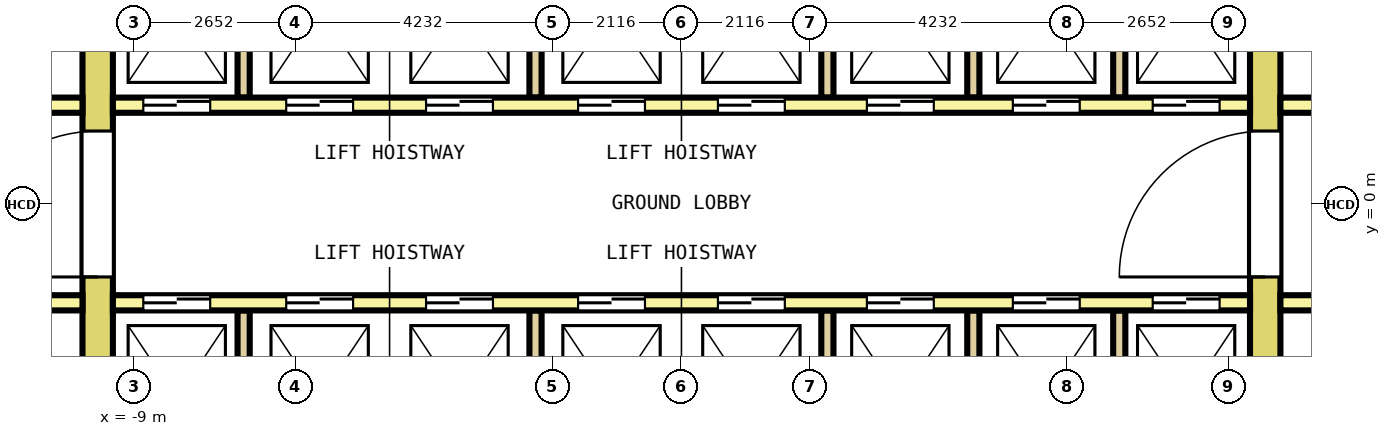
"""IFC4 building model, lengths in metres.
Left out: names, types, materials, properties, quantities, classifications, styles, units other than length and angle.
Written with IfcOpenShell. Run it as: python <this file> out.ifc"""

import sys

from ifc_helpers import new_model, si_unit, direction, frame, frame_2d, origin, place, context, subcontext, project, spatial, rectangle, extrude, element, fill, save


model = new_model("IFC4")
c1 = context("Model", 3, precision=1e-05, world=origin(), true_north=direction((0.0, 1.0)))
c2 = subcontext(c1, "Body", "Model", "MODEL_VIEW")
j1 = project(units=[si_unit("LENGTHUNIT", "METRE"), si_unit("PLANEANGLEUNIT", "RADIAN")], contexts=[c1])
p1 = place(None, origin())
s1 = spatial("IfcSite", under=j1, at=p1, CompositionType="ELEMENT")
p2 = place(p1, origin())
s2 = spatial("IfcBuilding", under=s1, at=p2, CompositionType="ELEMENT")
p3 = place(p2, origin())
s3 = spatial("IfcBuildingStorey", under=s2, at=p3, CompositionType="ELEMENT", Elevation=0.0)
p4 = place(p3, frame((-9.6, -7.7, 0.0), z_axis=(0.0, 0.0, 1.0), x_axis=(0.0, 1.0, 0.0)))
e1 = element("IfcWall", 1, at=p4, inside=s3, PredefinedType="SHEAR", context=c2, shape_type="SweptSolid", body=[
    extrude(rectangle(XDim=15.4, YDim=0.5, at=frame_2d((7.7, 0.0))), origin(), (0.0, 0.0, 1.0), 5.3),
])
p5 = place(p4, frame((6.5, 0.0, 0.0)))
e2 = element("IfcOpeningElement", 2, at=p5, cuts=e1, PredefinedType="OPENING", context=c2, shape_type="SweptSolid", body=[
    extrude(rectangle(XDim=2.4, YDim=2.1, at=frame_2d((1.2, 1.05))), frame((0.0, 0.26, 0.0), z_axis=(0.0, -1.0, 0.0), x_axis=(1.0, 0.0, 0.0)), (0.0, 0.0, 1.0), 0.52),
])
p6 = place(p4, frame((13.4, 0.0, 0.0)))
e3 = element("IfcOpeningElement", 3, at=p6, cuts=e1, PredefinedType="OPENING", context=c2, shape_type="SweptSolid", body=[
    extrude(rectangle(XDim=1.2, YDim=2.1, at=frame_2d((0.6, 1.05))), frame((0.0, 0.26, 0.0), z_axis=(0.0, -1.0, 0.0), x_axis=(1.0, 0.0, 0.0)), (0.0, 0.0, 1.0), 0.52),
])
p7 = place(p4, frame((0.8, 0.0, 0.0)))
e4 = element("IfcOpeningElement", 4, at=p7, cuts=e1, PredefinedType="OPENING", context=c2, shape_type="SweptSolid", body=[
    extrude(rectangle(XDim=1.2, YDim=2.1, at=frame_2d((0.6, 1.05))), frame((0.0, 0.26, 0.0), z_axis=(0.0, -1.0, 0.0), x_axis=(1.0, 0.0, 0.0)), (0.0, 0.0, 1.0), 0.52),
])
p8 = place(p3, frame((9.6, -7.7, 0.0), z_axis=(0.0, 0.0, 1.0), x_axis=(0.0, 1.0, 0.0)))
e5 = element("IfcWall", 5, at=p8, inside=s3, PredefinedType="SHEAR", context=c2, shape_type="SweptSolid", body=[
    extrude(rectangle(XDim=15.4, YDim=0.5, at=frame_2d((7.7, 0.0))), origin(), (0.0, 0.0, 1.0), 5.3),
])
p9 = place(p8, frame((6.5, 0.0, 0.0)))
e6 = element("IfcOpeningElement", 6, at=p9, cuts=e5, PredefinedType="OPENING", context=c2, shape_type="SweptSolid", body=[
    extrude(rectangle(XDim=2.4, YDim=2.1, at=frame_2d((1.2, 1.05))), frame((0.0, 0.26, 0.0), z_axis=(0.0, -1.0, 0.0), x_axis=(1.0, 0.0, 0.0)), (0.0, 0.0, 1.0), 0.52),
])
p10 = place(p8, frame((13.4, 0.0, 0.0)))
e7 = element("IfcOpeningElement", 7, at=p10, cuts=e5, PredefinedType="OPENING", context=c2, shape_type="SweptSolid", body=[
    extrude(rectangle(XDim=1.2, YDim=2.1, at=frame_2d((0.6, 1.05))), frame((0.0, 0.26, 0.0), z_axis=(0.0, -1.0, 0.0), x_axis=(1.0, 0.0, 0.0)), (0.0, 0.0, 1.0), 0.52),
])
p11 = place(p8, frame((0.9, 0.0, 0.0)))
e8 = element("IfcOpeningElement", 8, at=p11, cuts=e5, PredefinedType="OPENING", context=c2, shape_type="SweptSolid", body=[
    extrude(rectangle(XDim=1.0, YDim=2.1, at=frame_2d((0.5, 1.05))), frame((0.0, 0.26, 0.0), z_axis=(0.0, -1.0, 0.0), x_axis=(1.0, 0.0, 0.0)), (0.0, 0.0, 1.0), 0.52),
])
p12 = place(p3, frame((-12.75, 1.625, 0.0), z_axis=(0.0, 0.0, 1.0), x_axis=(1.0, 0.0, 0.0)))
e9 = element("IfcWall", 9, at=p12, inside=s3, PredefinedType="SOLIDWALL", context=c2, shape_type="SweptSolid", body=[
    extrude(rectangle(XDim=2.9, YDim=0.25, at=frame_2d((1.45, 0.0))), origin(), (0.0, 0.0, 1.0), 5.3),
])
p13 = place(p12, frame((0.9, 0.0, 0.0)))
e10 = element("IfcOpeningElement", 10, at=p13, cuts=e9, PredefinedType="OPENING", context=c2, shape_type="SweptSolid", body=[
    extrude(rectangle(XDim=1.1, YDim=2.1, at=frame_2d((0.55, 1.05))), frame((0.0, 0.135, 0.0), z_axis=(0.0, -1.0, 0.0), x_axis=(1.0, 0.0, 0.0)), (0.0, 0.0, 1.0), 0.27),
])
p14 = place(p3, frame((-9.35, 1.625, 0.0), z_axis=(0.0, 0.0, 1.0), x_axis=(1.0, 0.0, 0.0)))
e11 = element("IfcWall", 11, at=p14, inside=s3, PredefinedType="SOLIDWALL", context=c2, shape_type="SweptSolid", body=[
    extrude(rectangle(XDim=18.7, YDim=0.25, at=frame_2d((9.35, 0.0))), origin(), (0.0, 0.0, 1.0), 5.3),
])
p15 = place(p14, frame((0.5, 0.0, 0.0)))
e12 = element("IfcOpeningElement", 12, at=p15, cuts=e11, PredefinedType="OPENING", context=c2, shape_type="SweptSolid", body=[
    extrude(rectangle(XDim=1.1, YDim=2.1, at=frame_2d((0.55, 1.05))), frame((0.0, 0.135, 0.0), z_axis=(0.0, -1.0, 0.0), x_axis=(1.0, 0.0, 0.0)), (0.0, 0.0, 1.0), 0.27),
])
p16 = place(p14, frame((2.85, 0.0, 0.0)))
e13 = element("IfcOpeningElement", 13, at=p16, cuts=e11, PredefinedType="OPENING", context=c2, shape_type="SweptSolid", body=[
    extrude(rectangle(XDim=1.1, YDim=2.1, at=frame_2d((0.55, 1.05))), frame((0.0, 0.135, 0.0), z_axis=(0.0, -1.0, 0.0), x_axis=(1.0, 0.0, 0.0)), (0.0, 0.0, 1.0), 0.27),
])
p17 = place(p14, frame((5.15, 0.0, 0.0)))
e14 = element("IfcOpeningElement", 14, at=p17, cuts=e11, PredefinedType="OPENING", context=c2, shape_type="SweptSolid", body=[
    extrude(rectangle(XDim=1.1, YDim=2.1, at=frame_2d((0.55, 1.05))), frame((0.0, 0.135, 0.0), z_axis=(0.0, -1.0, 0.0), x_axis=(1.0, 0.0, 0.0)), (0.0, 0.0, 1.0), 0.27),
])
p18 = place(p14, frame((7.65, 0.0, 0.0)))
e15 = element("IfcOpeningElement", 15, at=p18, cuts=e11, PredefinedType="OPENING", context=c2, shape_type="SweptSolid", body=[
    extrude(rectangle(XDim=1.1, YDim=2.1, at=frame_2d((0.55, 1.05))), frame((0.0, 0.135, 0.0), z_axis=(0.0, -1.0, 0.0), x_axis=(1.0, 0.0, 0.0)), (0.0, 0.0, 1.0), 0.27),
])
p19 = place(p14, frame((9.95, 0.0, 0.0)))
e16 = element("IfcOpeningElement", 16, at=p19, cuts=e11, PredefinedType="OPENING", context=c2, shape_type="SweptSolid", body=[
    extrude(rectangle(XDim=1.1, YDim=2.1, at=frame_2d((0.55, 1.05))), frame((0.0, 0.135, 0.0), z_axis=(0.0, -1.0, 0.0), x_axis=(1.0, 0.0, 0.0)), (0.0, 0.0, 1.0), 0.27),
])
p20 = place(p14, frame((12.4, 0.0, 0.0)))
e17 = element("IfcOpeningElement", 17, at=p20, cuts=e11, PredefinedType="OPENING", context=c2, shape_type="SweptSolid", body=[
    extrude(rectangle(XDim=1.1, YDim=2.1, at=frame_2d((0.55, 1.05))), frame((0.0, 0.135, 0.0), z_axis=(0.0, -1.0, 0.0), x_axis=(1.0, 0.0, 0.0)), (0.0, 0.0, 1.0), 0.27),
])
p21 = place(p14, frame((14.8, 0.0, 0.0)))
e18 = element("IfcOpeningElement", 18, at=p21, cuts=e11, PredefinedType="OPENING", context=c2, shape_type="SweptSolid", body=[
    extrude(rectangle(XDim=1.1, YDim=2.1, at=frame_2d((0.55, 1.05))), frame((0.0, 0.135, 0.0), z_axis=(0.0, -1.0, 0.0), x_axis=(1.0, 0.0, 0.0)), (0.0, 0.0, 1.0), 0.27),
])
p22 = place(p14, frame((17.1, 0.0, 0.0)))
e19 = element("IfcOpeningElement", 19, at=p22, cuts=e11, PredefinedType="OPENING", context=c2, shape_type="SweptSolid", body=[
    extrude(rectangle(XDim=1.1, YDim=2.1, at=frame_2d((0.55, 1.05))), frame((0.0, 0.135, 0.0), z_axis=(0.0, -1.0, 0.0), x_axis=(1.0, 0.0, 0.0)), (0.0, 0.0, 1.0), 0.27),
])
p23 = place(p3, frame((9.85, 1.625, 0.0), z_axis=(0.0, 0.0, 1.0), x_axis=(1.0, 0.0, 0.0)))
e20 = element("IfcWall", 20, at=p23, inside=s3, PredefinedType="SOLIDWALL", context=c2, shape_type="SweptSolid", body=[
    extrude(rectangle(XDim=2.9, YDim=0.25, at=frame_2d((1.45, 0.0))), origin(), (0.0, 0.0, 1.0), 5.3),
])
p24 = place(p23, frame((0.9, 0.0, 0.0)))
e21 = element("IfcOpeningElement", 21, at=p24, cuts=e20, PredefinedType="OPENING", context=c2, shape_type="SweptSolid", body=[
    extrude(rectangle(XDim=1.1, YDim=2.1, at=frame_2d((0.55, 1.05))), frame((0.0, 0.135, 0.0), z_axis=(0.0, -1.0, 0.0), x_axis=(1.0, 0.0, 0.0)), (0.0, 0.0, 1.0), 0.27),
])
for number, where, z_axis, x_axis in (
    (22, (-7.2, 1.75, 0.0), (0.0, 0.0, 1.0), (0.0, 1.0, 0.0)),
    (23, (-2.4, 1.75, 0.0), (0.0, 0.0, 1.0), (0.0, 1.0, 0.0)),
    (24, (2.4, 1.75, 0.0), (0.0, 0.0, 1.0), (0.0, 1.0, 0.0)),
    (25, (4.8, 1.75, 0.0), (0.0, 0.0, 1.0), (0.0, 1.0, 0.0)),
    (26, (7.2, 1.75, 0.0), (0.0, 0.0, 1.0), (0.0, 1.0, 0.0)),
):
    element("IfcWall", number, at=place(p3, frame(where, z_axis=z_axis, x_axis=x_axis)), inside=s3, PredefinedType="SOLIDWALL", context=c2, shape_type="SweptSolid", body=[
        extrude(rectangle(XDim=2.9, YDim=0.2, at=frame_2d((1.45, 0.0))), origin(), (0.0, 0.0, 1.0), 5.3),
    ])
p25 = place(p3, frame((-12.75, -1.625, 0.0), z_axis=(0.0, 0.0, 1.0), x_axis=(1.0, 0.0, 0.0)))
e27 = element("IfcWall", 27, at=p25, inside=s3, PredefinedType="SOLIDWALL", context=c2, shape_type="SweptSolid", body=[
    extrude(rectangle(XDim=2.9, YDim=0.25, at=frame_2d((1.45, 0.0))), origin(), (0.0, 0.0, 1.0), 5.3),
])
p26 = place(p25, frame((0.9, 0.0, 0.0)))
e28 = element("IfcOpeningElement", 28, at=p26, cuts=e27, PredefinedType="OPENING", context=c2, shape_type="SweptSolid", body=[
    extrude(rectangle(XDim=1.1, YDim=2.1, at=frame_2d((0.55, 1.05))), frame((0.0, 0.135, 0.0), z_axis=(0.0, -1.0, 0.0), x_axis=(1.0, 0.0, 0.0)), (0.0, 0.0, 1.0), 0.27),
])
p27 = place(p3, frame((-9.35, -1.625, 0.0), z_axis=(0.0, 0.0, 1.0), x_axis=(1.0, 0.0, 0.0)))
e29 = element("IfcWall", 29, at=p27, inside=s3, PredefinedType="SOLIDWALL", context=c2, shape_type="SweptSolid", body=[
    extrude(rectangle(XDim=18.7, YDim=0.25, at=frame_2d((9.35, 0.0))), origin(), (0.0, 0.0, 1.0), 5.3),
])
p28 = place(p27, frame((0.5, 0.0, 0.0)))
e30 = element("IfcOpeningElement", 30, at=p28, cuts=e29, PredefinedType="OPENING", context=c2, shape_type="SweptSolid", body=[
    extrude(rectangle(XDim=1.1, YDim=2.1, at=frame_2d((0.55, 1.05))), frame((0.0, 0.135, 0.0), z_axis=(0.0, -1.0, 0.0), x_axis=(1.0, 0.0, 0.0)), (0.0, 0.0, 1.0), 0.27),
])
p29 = place(p27, frame((2.85, 0.0, 0.0)))
e31 = element("IfcOpeningElement", 31, at=p29, cuts=e29, PredefinedType="OPENING", context=c2, shape_type="SweptSolid", body=[
    extrude(rectangle(XDim=1.1, YDim=2.1, at=frame_2d((0.55, 1.05))), frame((0.0, 0.135, 0.0), z_axis=(0.0, -1.0, 0.0), x_axis=(1.0, 0.0, 0.0)), (0.0, 0.0, 1.0), 0.27),
])
p30 = place(p27, frame((5.15, 0.0, 0.0)))
e32 = element("IfcOpeningElement", 32, at=p30, cuts=e29, PredefinedType="OPENING", context=c2, shape_type="SweptSolid", body=[
    extrude(rectangle(XDim=1.1, YDim=2.1, at=frame_2d((0.55, 1.05))), frame((0.0, 0.135, 0.0), z_axis=(0.0, -1.0, 0.0), x_axis=(1.0, 0.0, 0.0)), (0.0, 0.0, 1.0), 0.27),
])
p31 = place(p27, frame((7.65, 0.0, 0.0)))
e33 = element("IfcOpeningElement", 33, at=p31, cuts=e29, PredefinedType="OPENING", context=c2, shape_type="SweptSolid", body=[
    extrude(rectangle(XDim=1.1, YDim=2.1, at=frame_2d((0.55, 1.05))), frame((0.0, 0.135, 0.0), z_axis=(0.0, -1.0, 0.0), x_axis=(1.0, 0.0, 0.0)), (0.0, 0.0, 1.0), 0.27),
])
p32 = place(p27, frame((9.95, 0.0, 0.0)))
e34 = element("IfcOpeningElement", 34, at=p32, cuts=e29, PredefinedType="OPENING", context=c2, shape_type="SweptSolid", body=[
    extrude(rectangle(XDim=1.1, YDim=2.1, at=frame_2d((0.55, 1.05))), frame((0.0, 0.135, 0.0), z_axis=(0.0, -1.0, 0.0), x_axis=(1.0, 0.0, 0.0)), (0.0, 0.0, 1.0), 0.27),
])
p33 = place(p27, frame((12.4, 0.0, 0.0)))
e35 = element("IfcOpeningElement", 35, at=p33, cuts=e29, PredefinedType="OPENING", context=c2, shape_type="SweptSolid", body=[
    extrude(rectangle(XDim=1.1, YDim=2.1, at=frame_2d((0.55, 1.05))), frame((0.0, 0.135, 0.0), z_axis=(0.0, -1.0, 0.0), x_axis=(1.0, 0.0, 0.0)), (0.0, 0.0, 1.0), 0.27),
])
p34 = place(p27, frame((14.8, 0.0, 0.0)))
e36 = element("IfcOpeningElement", 36, at=p34, cuts=e29, PredefinedType="OPENING", context=c2, shape_type="SweptSolid", body=[
    extrude(rectangle(XDim=1.1, YDim=2.1, at=frame_2d((0.55, 1.05))), frame((0.0, 0.135, 0.0), z_axis=(0.0, -1.0, 0.0), x_axis=(1.0, 0.0, 0.0)), (0.0, 0.0, 1.0), 0.27),
])
p35 = place(p27, frame((17.1, 0.0, 0.0)))
e37 = element("IfcOpeningElement", 37, at=p35, cuts=e29, PredefinedType="OPENING", context=c2, shape_type="SweptSolid", body=[
    extrude(rectangle(XDim=1.1, YDim=2.1, at=frame_2d((0.55, 1.05))), frame((0.0, 0.135, 0.0), z_axis=(0.0, -1.0, 0.0), x_axis=(1.0, 0.0, 0.0)), (0.0, 0.0, 1.0), 0.27),
])
p36 = place(p3, frame((9.85, -1.625, 0.0), z_axis=(0.0, 0.0, 1.0), x_axis=(1.0, 0.0, 0.0)))
e38 = element("IfcWall", 38, at=p36, inside=s3, PredefinedType="SOLIDWALL", context=c2, shape_type="SweptSolid", body=[
    extrude(rectangle(XDim=2.9, YDim=0.25, at=frame_2d((1.45, 0.0))), origin(), (0.0, 0.0, 1.0), 5.3),
])
p37 = place(p36, frame((0.9, 0.0, 0.0)))
e39 = element("IfcOpeningElement", 39, at=p37, cuts=e38, PredefinedType="OPENING", context=c2, shape_type="SweptSolid", body=[
    extrude(rectangle(XDim=1.1, YDim=2.1, at=frame_2d((0.55, 1.05))), frame((0.0, 0.135, 0.0), z_axis=(0.0, -1.0, 0.0), x_axis=(1.0, 0.0, 0.0)), (0.0, 0.0, 1.0), 0.27),
])
for number, where, z_axis, x_axis in (
    (40, (-7.2, -4.65, 0.0), (0.0, 0.0, 1.0), (0.0, 1.0, 0.0)),
    (41, (-2.4, -4.65, 0.0), (0.0, 0.0, 1.0), (0.0, 1.0, 0.0)),
    (42, (2.4, -4.65, 0.0), (0.0, 0.0, 1.0), (0.0, 1.0, 0.0)),
    (43, (4.8, -4.65, 0.0), (0.0, 0.0, 1.0), (0.0, 1.0, 0.0)),
    (44, (7.2, -4.65, 0.0), (0.0, 0.0, 1.0), (0.0, 1.0, 0.0)),
):
    element("IfcWall", number, at=place(p3, frame(where, z_axis=z_axis, x_axis=x_axis)), inside=s3, PredefinedType="SOLIDWALL", context=c2, shape_type="SweptSolid", body=[
        extrude(rectangle(XDim=2.9, YDim=0.2, at=frame_2d((1.45, 0.0))), origin(), (0.0, 0.0, 1.0), 5.3),
    ])
p38 = place(p15, origin())
e45 = element("IfcDoor", 45, at=p38, inside=s3, OperationType="DOUBLE_DOOR_SLIDING", PredefinedType="DOOR", context=c2, shape_type="SweptSolid", body=[
    extrude(rectangle(XDim=1.1, YDim=2.1, at=frame_2d((0.55, 1.05))), frame((0.0, 0.075, 0.0), z_axis=(0.0, -1.0, 0.0), x_axis=(1.0, 0.0, 0.0)), (0.0, 0.0, 1.0), 0.15),
])
fill(e12, e45)
p39 = place(p16, origin())
e46 = element("IfcDoor", 46, at=p39, inside=s3, OperationType="DOUBLE_DOOR_SLIDING", PredefinedType="DOOR", context=c2, shape_type="SweptSolid", body=[
    extrude(rectangle(XDim=1.1, YDim=2.1, at=frame_2d((0.55, 1.05))), frame((0.0, 0.075, 0.0), z_axis=(0.0, -1.0, 0.0), x_axis=(1.0, 0.0, 0.0)), (0.0, 0.0, 1.0), 0.15),
])
fill(e13, e46)
p40 = place(p17, origin())
e47 = element("IfcDoor", 47, at=p40, inside=s3, OperationType="DOUBLE_DOOR_SLIDING", PredefinedType="DOOR", context=c2, shape_type="SweptSolid", body=[
    extrude(rectangle(XDim=1.1, YDim=2.1, at=frame_2d((0.55, 1.05))), frame((0.0, 0.075, 0.0), z_axis=(0.0, -1.0, 0.0), x_axis=(1.0, 0.0, 0.0)), (0.0, 0.0, 1.0), 0.15),
])
fill(e14, e47)
p41 = place(p18, origin())
e48 = element("IfcDoor", 48, at=p41, inside=s3, OperationType="DOUBLE_DOOR_SLIDING", PredefinedType="DOOR", context=c2, shape_type="SweptSolid", body=[
    extrude(rectangle(XDim=1.1, YDim=2.1, at=frame_2d((0.55, 1.05))), frame((0.0, 0.075, 0.0), z_axis=(0.0, -1.0, 0.0), x_axis=(1.0, 0.0, 0.0)), (0.0, 0.0, 1.0), 0.15),
])
fill(e15, e48)
p42 = place(p19, origin())
e49 = element("IfcDoor", 49, at=p42, inside=s3, OperationType="DOUBLE_DOOR_SLIDING", PredefinedType="DOOR", context=c2, shape_type="SweptSolid", body=[
    extrude(rectangle(XDim=1.1, YDim=2.1, at=frame_2d((0.55, 1.05))), frame((0.0, 0.075, 0.0), z_axis=(0.0, -1.0, 0.0), x_axis=(1.0, 0.0, 0.0)), (0.0, 0.0, 1.0), 0.15),
])
fill(e16, e49)
p43 = place(p20, origin())
e50 = element("IfcDoor", 50, at=p43, inside=s3, OperationType="DOUBLE_DOOR_SLIDING", PredefinedType="DOOR", context=c2, shape_type="SweptSolid", body=[
    extrude(rectangle(XDim=1.1, YDim=2.1, at=frame_2d((0.55, 1.05))), frame((0.0, 0.075, 0.0), z_axis=(0.0, -1.0, 0.0), x_axis=(1.0, 0.0, 0.0)), (0.0, 0.0, 1.0), 0.15),
])
fill(e17, e50)
p44 = place(p21, origin())
e51 = element("IfcDoor", 51, at=p44, inside=s3, OperationType="DOUBLE_DOOR_SLIDING", PredefinedType="DOOR", context=c2, shape_type="SweptSolid", body=[
    extrude(rectangle(XDim=1.1, YDim=2.1, at=frame_2d((0.55, 1.05))), frame((0.0, 0.075, 0.0), z_axis=(0.0, -1.0, 0.0), x_axis=(1.0, 0.0, 0.0)), (0.0, 0.0, 1.0), 0.15),
])
fill(e18, e51)
p45 = place(p22, origin())
e52 = element("IfcDoor", 52, at=p45, inside=s3, OperationType="DOUBLE_DOOR_SLIDING", PredefinedType="DOOR", context=c2, shape_type="SweptSolid", body=[
    extrude(rectangle(XDim=1.1, YDim=2.1, at=frame_2d((0.55, 1.05))), frame((0.0, 0.075, 0.0), z_axis=(0.0, -1.0, 0.0), x_axis=(1.0, 0.0, 0.0)), (0.0, 0.0, 1.0), 0.15),
])
fill(e19, e52)
p46 = place(p28, origin())
e53 = element("IfcDoor", 53, at=p46, inside=s3, OperationType="DOUBLE_DOOR_SLIDING", PredefinedType="DOOR", context=c2, shape_type="SweptSolid", body=[
    extrude(rectangle(XDim=1.1, YDim=2.1, at=frame_2d((0.55, 1.05))), frame((0.0, 0.075, 0.0), z_axis=(0.0, -1.0, 0.0), x_axis=(1.0, 0.0, 0.0)), (0.0, 0.0, 1.0), 0.15),
])
fill(e30, e53)
p47 = place(p29, origin())
e54 = element("IfcDoor", 54, at=p47, inside=s3, OperationType="DOUBLE_DOOR_SLIDING", PredefinedType="DOOR", context=c2, shape_type="SweptSolid", body=[
    extrude(rectangle(XDim=1.1, YDim=2.1, at=frame_2d((0.55, 1.05))), frame((0.0, 0.075, 0.0), z_axis=(0.0, -1.0, 0.0), x_axis=(1.0, 0.0, 0.0)), (0.0, 0.0, 1.0), 0.15),
])
fill(e31, e54)
p48 = place(p30, origin())
e55 = element("IfcDoor", 55, at=p48, inside=s3, OperationType="DOUBLE_DOOR_SLIDING", PredefinedType="DOOR", context=c2, shape_type="SweptSolid", body=[
    extrude(rectangle(XDim=1.1, YDim=2.1, at=frame_2d((0.55, 1.05))), frame((0.0, 0.075, 0.0), z_axis=(0.0, -1.0, 0.0), x_axis=(1.0, 0.0, 0.0)), (0.0, 0.0, 1.0), 0.15),
])
fill(e32, e55)
p49 = place(p31, origin())
e56 = element("IfcDoor", 56, at=p49, inside=s3, OperationType="DOUBLE_DOOR_SLIDING", PredefinedType="DOOR", context=c2, shape_type="SweptSolid", body=[
    extrude(rectangle(XDim=1.1, YDim=2.1, at=frame_2d((0.55, 1.05))), frame((0.0, 0.075, 0.0), z_axis=(0.0, -1.0, 0.0), x_axis=(1.0, 0.0, 0.0)), (0.0, 0.0, 1.0), 0.15),
])
fill(e33, e56)
p50 = place(p32, origin())
e57 = element("IfcDoor", 57, at=p50, inside=s3, OperationType="DOUBLE_DOOR_SLIDING", PredefinedType="DOOR", context=c2, shape_type="SweptSolid", body=[
    extrude(rectangle(XDim=1.1, YDim=2.1, at=frame_2d((0.55, 1.05))), frame((0.0, 0.075, 0.0), z_axis=(0.0, -1.0, 0.0), x_axis=(1.0, 0.0, 0.0)), (0.0, 0.0, 1.0), 0.15),
])
fill(e34, e57)
p51 = place(p33, origin())
e58 = element("IfcDoor", 58, at=p51, inside=s3, OperationType="DOUBLE_DOOR_SLIDING", PredefinedType="DOOR", context=c2, shape_type="SweptSolid", body=[
    extrude(rectangle(XDim=1.1, YDim=2.1, at=frame_2d((0.55, 1.05))), frame((0.0, 0.075, 0.0), z_axis=(0.0, -1.0, 0.0), x_axis=(1.0, 0.0, 0.0)), (0.0, 0.0, 1.0), 0.15),
])
fill(e35, e58)
p52 = place(p34, origin())
e59 = element("IfcDoor", 59, at=p52, inside=s3, OperationType="DOUBLE_DOOR_SLIDING", PredefinedType="DOOR", context=c2, shape_type="SweptSolid", body=[
    extrude(rectangle(XDim=1.1, YDim=2.1, at=frame_2d((0.55, 1.05))), frame((0.0, 0.075, 0.0), z_axis=(0.0, -1.0, 0.0), x_axis=(1.0, 0.0, 0.0)), (0.0, 0.0, 1.0), 0.15),
])
fill(e36, e59)
p53 = place(p35, origin())
e60 = element("IfcDoor", 60, at=p53, inside=s3, OperationType="DOUBLE_DOOR_SLIDING", PredefinedType="DOOR", context=c2, shape_type="SweptSolid", body=[
    extrude(rectangle(XDim=1.1, YDim=2.1, at=frame_2d((0.55, 1.05))), frame((0.0, 0.075, 0.0), z_axis=(0.0, -1.0, 0.0), x_axis=(1.0, 0.0, 0.0)), (0.0, 0.0, 1.0), 0.15),
])
fill(e37, e60)
p54 = place(p5, origin())
e61 = element("IfcDoor", 61, at=p54, inside=s3, OperationType="DOUBLE_DOOR_SINGLE_SWING", PredefinedType="DOOR", context=c2, shape_type="SweptSolid", body=[
    extrude(rectangle(XDim=2.4, YDim=2.1, at=frame_2d((1.2, 1.05))), frame((0.0, 0.2, 0.0), z_axis=(0.0, -1.0, 0.0), x_axis=(1.0, 0.0, 0.0)), (0.0, 0.0, 1.0), 0.4),
])
fill(e2, e61)
p55 = place(p9, origin())
e62 = element("IfcDoor", 62, at=p55, inside=s3, OperationType="DOUBLE_DOOR_SINGLE_SWING", PredefinedType="DOOR", context=c2, shape_type="SweptSolid", body=[
    extrude(rectangle(XDim=2.4, YDim=2.1, at=frame_2d((1.2, 1.05))), frame((0.0, 0.2, 0.0), z_axis=(0.0, -1.0, 0.0), x_axis=(1.0, 0.0, 0.0)), (0.0, 0.0, 1.0), 0.4),
])
fill(e6, e62)
save(model, sys.argv[1])
